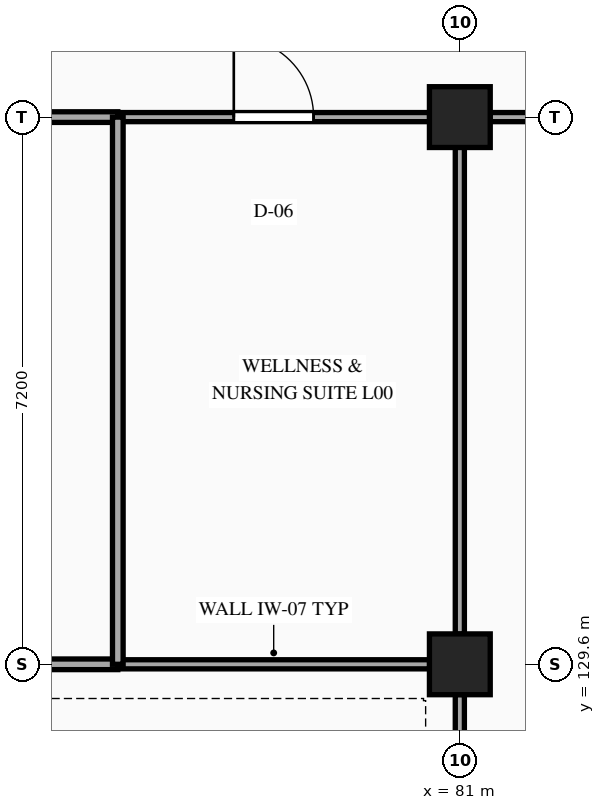
"""IFC4 building model, lengths in metres.
Left out: names, types, materials, properties, quantities, classifications, styles, units other than length and angle.
Written with IfcOpenShell. Run it as: python <this file> out.ifc"""

import sys

from ifc_helpers import new_model, si_unit, direction, frame, frame_2d, origin, origin_2d, place, context, subcontext, project, spatial, rectangle, extrude, element, fill, save


model = new_model("IFC4")
c1 = context("Model", 3, precision=1e-05, world=origin(), true_north=direction((0.0, 1.0)))
c2 = subcontext(c1, "Body", "Model", "MODEL_VIEW")
j1 = project(units=[si_unit("LENGTHUNIT", "METRE"), si_unit("PLANEANGLEUNIT", "RADIAN")], contexts=[c1])
p1 = place(None, origin())
s1 = spatial("IfcSite", under=j1, at=p1, CompositionType="ELEMENT")
p2 = place(p1, origin())
s2 = spatial("IfcBuilding", under=s1, at=p2, CompositionType="ELEMENT")
p3 = place(p2, origin())
s3 = spatial("IfcBuildingStorey", under=s2, at=p3, CompositionType="ELEMENT", Elevation=0.0)
for number, where, z_axis, x_axis in (
    (1, (81.0, 129.6, 0.0), (0.0, 0.0, 1.0), (1.0, 0.0, 0.0)),
    (2, (81.0, 136.8, 0.0), (0.0, 0.0, 1.0), (1.0, 0.0, 0.0)),
):
    element("IfcColumn", number, at=place(p3, frame(where, z_axis=z_axis, x_axis=x_axis)), inside=s3, PredefinedType="COLUMN", context=c2, shape_type="SweptSolid", body=[
        extrude(rectangle(XDim=0.8, YDim=0.8, at=origin_2d()), origin(), (0.0, 0.0, 1.0), 5.4),
    ])
p4 = place(p3, frame((72.398, 129.6, 0.0), z_axis=(0.0, 0.0, 1.0), x_axis=(1.0, 0.0, 0.0)))
e3 = element("IfcWall", 3, at=p4, inside=s3, PredefinedType="PARTITIONING", context=c2, shape_type="SweptSolid", body=[
    extrude(rectangle(XDim=4.102, YDim=0.14, at=frame_2d((2.051, 0.0))), origin(), (0.0, 0.0, 1.0), 4.424),
])
p5 = place(p3, frame((76.5, 129.6, 0.0), z_axis=(0.0, 0.0, 1.0), x_axis=(1.0, 0.0, 0.0)))
e4 = element("IfcWall", 4, at=p5, inside=s3, PredefinedType="PARTITIONING", context=c2, shape_type="SweptSolid", body=[
    extrude(rectangle(XDim=4.102, YDim=0.12, at=frame_2d((2.051, 0.0))), origin(), (0.0, 0.0, 1.0), 4.424),
])
p6 = place(p3, frame((72.398, 136.8, 0.0), z_axis=(0.0, 0.0, 1.0), x_axis=(1.0, 0.0, 0.0)))
e5 = element("IfcWall", 5, at=p6, inside=s3, PredefinedType="PARTITIONING", context=c2, shape_type="SweptSolid", body=[
    extrude(rectangle(XDim=4.102, YDim=0.14, at=frame_2d((2.051, 0.0))), origin(), (0.0, 0.0, 1.0), 4.424),
])
p7 = place(p6, frame((1.576, 0.0, 0.0)))
e6 = element("IfcOpeningElement", 6, at=p7, cuts=e5, PredefinedType="OPENING", context=c2, shape_type="SweptSolid", body=[
    extrude(rectangle(XDim=0.95, YDim=2.1, at=frame_2d((0.475, 1.05))), frame((0.0, 0.08, 0.0), z_axis=(0.0, -1.0, 0.0), x_axis=(1.0, 0.0, 0.0)), (0.0, 0.0, 1.0), 0.16),
])
p8 = place(p3, frame((76.5, 136.8, 0.0), z_axis=(0.0, 0.0, 1.0), x_axis=(1.0, 0.0, 0.0)))
e7 = element("IfcWall", 7, at=p8, inside=s3, PredefinedType="PARTITIONING", context=c2, shape_type="SweptSolid", body=[
    extrude(rectangle(XDim=4.102, YDim=0.12, at=frame_2d((2.051, 0.0))), origin(), (0.0, 0.0, 1.0), 4.424),
])
p9 = place(p8, frame((1.526, 0.0, 0.0)))
e8 = element("IfcOpeningElement", 8, at=p9, cuts=e7, PredefinedType="OPENING", context=c2, shape_type="SweptSolid", body=[
    extrude(rectangle(XDim=1.05, YDim=2.15, at=frame_2d((0.525, 1.075))), frame((0.0, 0.07, 0.0), z_axis=(0.0, -1.0, 0.0), x_axis=(1.0, 0.0, 0.0)), (0.0, 0.0, 1.0), 0.14),
])
p10 = place(p3, frame((81.398, 136.8, 0.0), z_axis=(0.0, 0.0, 1.0), x_axis=(1.0, 0.0, 0.0)))
e9 = element("IfcWall", 9, at=p10, inside=s3, PredefinedType="PARTITIONING", context=c2, shape_type="SweptSolid", body=[
    extrude(rectangle(XDim=8.204, YDim=0.12, at=frame_2d((4.102, 0.0))), origin(), (0.0, 0.0, 1.0), 4.424),
])
p11 = place(p10, frame((3.602, 0.0, 0.0)))
e10 = element("IfcOpeningElement", 10, at=p11, cuts=e9, PredefinedType="OPENING", context=c2, shape_type="SweptSolid", body=[
    extrude(rectangle(XDim=1.0, YDim=2.15, at=frame_2d((0.5, 1.075))), frame((0.0, 0.07, 0.0), z_axis=(0.0, -1.0, 0.0), x_axis=(1.0, 0.0, 0.0)), (0.0, 0.0, 1.0), 0.14),
])
p12 = place(p3, frame((76.5, 129.6, 0.0), z_axis=(0.0, 0.0, 1.0), x_axis=(0.0, 1.0, 0.0)))
e11 = element("IfcWall", 11, at=p12, inside=s3, PredefinedType="PARTITIONING", context=c2, shape_type="SweptSolid", body=[
    extrude(rectangle(XDim=7.2, YDim=0.14, at=frame_2d((3.6, 0.0))), origin(), (0.0, 0.0, 1.0), 4.424),
])
p13 = place(p3, frame((81.0, 122.65, 0.0), z_axis=(0.0, 0.0, 1.0), x_axis=(0.0, 1.0, 0.0)))
e12 = element("IfcWall", 12, at=p13, inside=s3, PredefinedType="PARTITIONING", context=c2, shape_type="SweptSolid", body=[
    extrude(rectangle(XDim=6.552, YDim=0.12, at=frame_2d((3.276, 0.0))), origin(), (0.0, 0.0, 1.0), 4.424),
])
p14 = place(p3, frame((81.0, 129.998, 0.0), z_axis=(0.0, 0.0, 1.0), x_axis=(0.0, 1.0, 0.0)))
e13 = element("IfcWall", 13, at=p14, inside=s3, PredefinedType="PARTITIONING", context=c2, shape_type="SweptSolid", body=[
    extrude(rectangle(XDim=6.404, YDim=0.12, at=frame_2d((3.202, 0.0))), origin(), (0.0, 0.0, 1.0), 4.437),
])
p15 = place(p9, origin())
e14 = element("IfcDoor", 14, at=p15, inside=s3, OperationType="SINGLE_SWING_LEFT", PredefinedType="DOOR", context=c2, shape_type="SweptSolid", body=[
    extrude(rectangle(XDim=1.05, YDim=2.15, at=frame_2d((0.525, 1.075))), frame((0.0, 0.025, 0.0), z_axis=(0.0, -1.0, 0.0), x_axis=(1.0, 0.0, 0.0)), (0.0, 0.0, 1.0), 0.05),
])
fill(e8, e14)
save(model, sys.argv[1])
